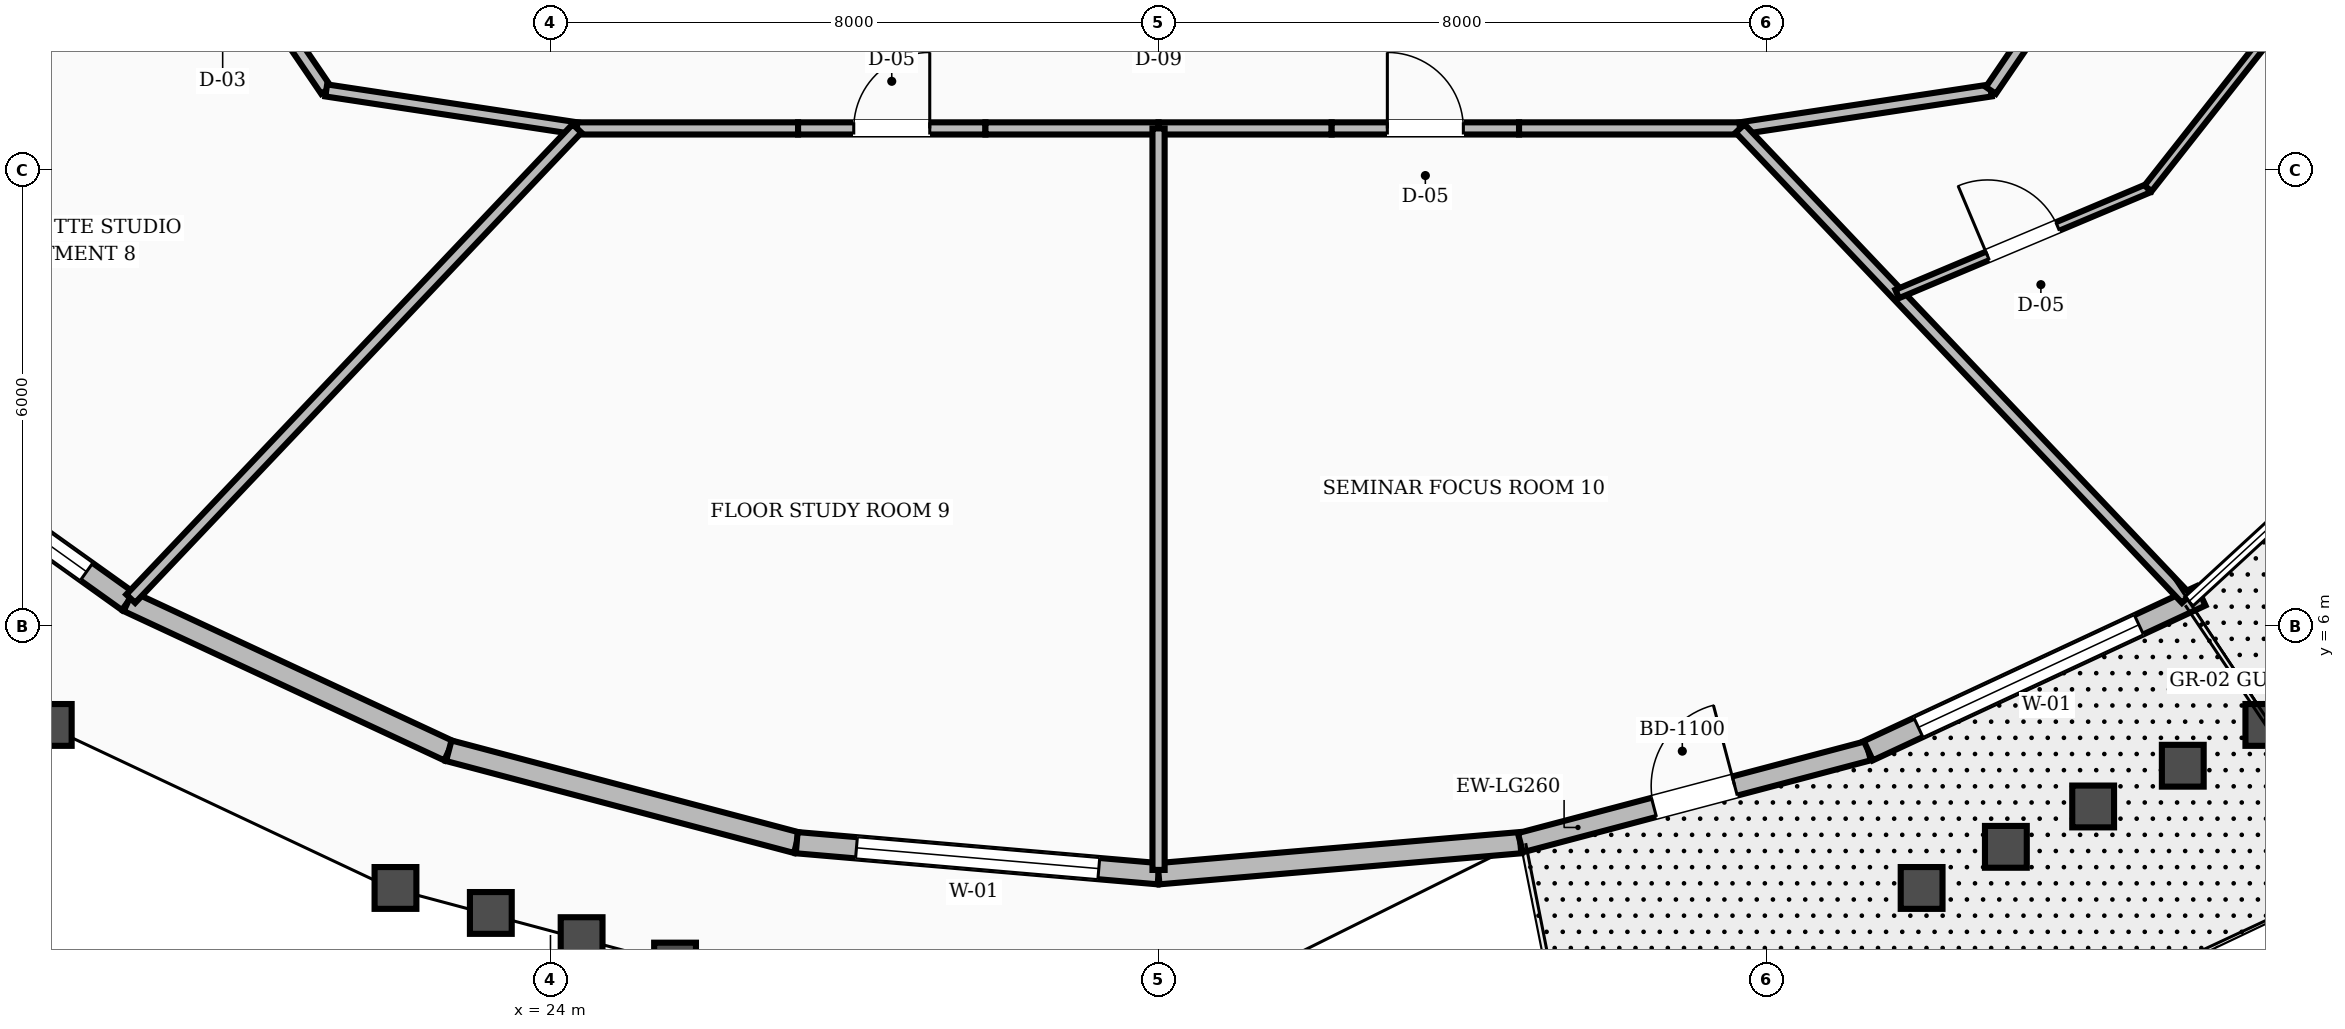
"""IFC4 building model, lengths in metres.
Left out: names, types, materials, properties, quantities, classifications, styles, units other than length and angle.
Written with IfcOpenShell. Run it as: python <this file> out.ifc"""

import sys

from ifc_helpers import new_model, si_unit, direction, frame, frame_2d, origin, place, context, subcontext, project, spatial, rectangle, extrude, element, fill, save


model = new_model("IFC4")
c1 = context("Model", 3, precision=1e-05, world=origin(), true_north=direction((0.0, 1.0)))
c2 = subcontext(c1, "Body", "Model", "MODEL_VIEW")
j1 = project(units=[si_unit("LENGTHUNIT", "METRE"), si_unit("PLANEANGLEUNIT", "RADIAN")], contexts=[c1])
p1 = place(None, origin())
s1 = spatial("IfcSite", under=j1, at=p1, CompositionType="ELEMENT")
p2 = place(p1, origin())
s2 = spatial("IfcBuilding", under=s1, at=p2, CompositionType="ELEMENT")
p3 = place(p2, frame((0.0, 0.0, 200.0)))
s3 = spatial("IfcBuildingStorey", under=s2, at=p3, CompositionType="ELEMENT", Elevation=200.0)
p4 = place(p3, frame((14.746, 8.97, 0.0), z_axis=(0.0, 0.0, 1.0), x_axis=(0.813519294528, -0.581537924327, 0.0)))
e1 = element("IfcWall", 1, at=p4, inside=s3, PredefinedType="STANDARD", context=c2, shape_type="SweptSolid", body=[
    extrude(rectangle(XDim=4.545, YDim=0.28, at=frame_2d((2.273, 0.0))), origin(), (0.0, 0.0, 1.0), 2.77),
])
p5 = place(p4, frame((0.673, 0.0, 0.8)))
e2 = element("IfcOpeningElement", 2, at=p5, cuts=e1, PredefinedType="OPENING", context=c2, shape_type="SweptSolid", body=[
    extrude(rectangle(XDim=3.2, YDim=1.65, at=frame_2d((1.6, 0.825))), frame((0.0, 0.15, 0.0), z_axis=(0.0, -1.0, 0.0), x_axis=(1.0, 0.0, 0.0)), (0.0, 0.0, 1.0), 0.3),
])
p6 = place(p3, frame((18.444, 6.327, 0.0), z_axis=(0.0, 0.0, 1.0), x_axis=(0.906555409807, -0.422086826315, 0.0)))
e3 = element("IfcWall", 3, at=p6, inside=s3, PredefinedType="STANDARD", context=c2, shape_type="SweptSolid", body=[
    extrude(rectangle(XDim=4.653, YDim=0.28, at=frame_2d((2.327, 0.0))), origin(), (0.0, 0.0, 1.0), 2.77),
])
p7 = place(p3, frame((22.662, 4.363, 0.0), z_axis=(0.0, 0.0, 1.0), x_axis=(0.966819561224, -0.255460243549, 0.0)))
e4 = element("IfcWall", 4, at=p7, inside=s3, PredefinedType="STANDARD", context=c2, shape_type="SweptSolid", body=[
    extrude(rectangle(XDim=4.734, YDim=0.28, at=frame_2d((2.367, 0.0))), origin(), (0.0, 0.0, 1.0), 2.77),
])
p8 = place(p3, frame((27.24, 3.153, 0.0), z_axis=(0.0, 0.0, 1.0), x_axis=(0.996339067147, -0.085489550689, 0.0)))
e5 = element("IfcWall", 5, at=p8, inside=s3, PredefinedType="STANDARD", context=c2, shape_type="SweptSolid", body=[
    extrude(rectangle(XDim=4.778, YDim=0.28, at=frame_2d((2.389, 0.0))), origin(), (0.0, 0.0, 1.0), 2.77),
])
p9 = place(p8, frame((0.789, 0.0, 0.8)))
e6 = element("IfcOpeningElement", 6, at=p9, cuts=e5, PredefinedType="OPENING", context=c2, shape_type="SweptSolid", body=[
    extrude(rectangle(XDim=3.2, YDim=1.65, at=frame_2d((1.6, 0.825))), frame((0.0, 0.15, 0.0), z_axis=(0.0, -1.0, 0.0), x_axis=(1.0, 0.0, 0.0)), (0.0, 0.0, 1.0), 0.3),
])
p10 = place(p3, frame((32.0, 2.745, 0.0), z_axis=(0.0, 0.0, 1.0), x_axis=(0.996339067147, 0.085489550689, 0.0)))
e7 = element("IfcWall", 7, at=p10, inside=s3, PredefinedType="STANDARD", context=c2, shape_type="SweptSolid", body=[
    extrude(rectangle(XDim=4.778, YDim=0.28, at=frame_2d((2.389, 0.0))), origin(), (0.0, 0.0, 1.0), 2.77),
])
p11 = place(p3, frame((36.76, 3.153, 0.0), z_axis=(0.0, 0.0, 1.0), x_axis=(0.966819561224, 0.255460243549, 0.0)))
e8 = element("IfcWall", 8, at=p11, inside=s3, PredefinedType="STANDARD", context=c2, shape_type="SweptSolid", body=[
    extrude(rectangle(XDim=4.734, YDim=0.26, at=frame_2d((2.367, 0.0))), origin(), (0.0, 0.0, 1.0), 2.77),
])
p12 = place(p11, frame((1.817, 0.0, 0.0)))
e9 = element("IfcOpeningElement", 9, at=p12, cuts=e8, PredefinedType="OPENING", context=c2, shape_type="SweptSolid", body=[
    extrude(rectangle(XDim=1.1, YDim=2.15, at=frame_2d((0.55, 1.075))), frame((0.0, 0.14, 0.0), z_axis=(0.0, -1.0, 0.0), x_axis=(1.0, 0.0, 0.0)), (0.0, 0.0, 1.0), 0.28),
])
p13 = place(p3, frame((41.338, 4.363, 0.0), z_axis=(0.0, 0.0, 1.0), x_axis=(0.906549700707, 0.422099088068, 0.0)))
e10 = element("IfcWall", 10, at=p13, inside=s3, PredefinedType="STANDARD", context=c2, shape_type="SweptSolid", body=[
    extrude(rectangle(XDim=4.828, YDim=0.28, at=frame_2d((2.414, 0.0))), origin(), (0.0, 0.0, 1.0), 2.77),
])
p14 = place(p13, frame((0.727, 0.0, 0.8)))
e11 = element("IfcOpeningElement", 11, at=p14, cuts=e10, PredefinedType="OPENING", context=c2, shape_type="SweptSolid", body=[
    extrude(rectangle(XDim=3.2, YDim=1.65, at=frame_2d((1.6, 0.825))), frame((0.0, 0.15, 0.0), z_axis=(0.0, -1.0, 0.0), x_axis=(1.0, 0.0, 0.0)), (0.0, 0.0, 1.0), 0.3),
])
p15 = place(p3, frame((19.35, 15.548, 0.0), z_axis=(0.0, 0.0, 1.0), x_axis=(0.562674669208, -0.826678423955, 0.0)))
e12 = element("IfcWall", 12, at=p15, inside=s3, PredefinedType="SOLIDWALL", context=c2, shape_type="SweptSolid", body=[
    extrude(rectangle(XDim=3.021, YDim=0.16, at=frame_2d((1.511, 0.0))), origin(), (0.0, 0.0, 1.0), 2.75),
])
p16 = place(p15, frame((1.036, 0.0, 0.0)))
e13 = element("IfcOpeningElement", 13, at=p16, cuts=e12, PredefinedType="OPENING", context=c2, shape_type="SweptSolid", body=[
    extrude(rectangle(XDim=0.95, YDim=2.1, at=frame_2d((0.475, 1.05))), frame((0.0, 0.09, 0.0), z_axis=(0.0, -1.0, 0.0), x_axis=(1.0, 0.0, 0.0)), (0.0, 0.0, 1.0), 0.18),
])
p17 = place(p3, frame((21.05, 13.05, 0.0), z_axis=(0.0, 0.0, 1.0), x_axis=(0.988710906508, -0.149835721217, 0.0)))
e14 = element("IfcWall", 14, at=p17, inside=s3, PredefinedType="SOLIDWALL", context=c2, shape_type="SweptSolid", body=[
    extrude(rectangle(XDim=3.337, YDim=0.16, at=frame_2d((1.668, 0.0))), origin(), (0.0, 0.0, 1.0), 2.75),
])
p18 = place(p3, frame((24.349, 12.55, 0.0), z_axis=(0.0, 0.0, 1.0), x_axis=(1.0, 0.0, 0.0)))
e15 = element("IfcWall", 15, at=p18, inside=s3, PredefinedType="SOLIDWALL", context=c2, shape_type="SweptSolid", body=[
    extrude(rectangle(XDim=2.908, YDim=0.16, at=frame_2d((1.454, 0.0))), origin(), (0.0, 0.0, 1.0), 2.75),
])
p19 = place(p3, frame((27.257, 12.55, 0.0), z_axis=(0.0, 0.0, 1.0), x_axis=(1.0, 0.0, 0.0)))
e16 = element("IfcWall", 16, at=p19, inside=s3, PredefinedType="SOLIDWALL", context=c2, shape_type="SweptSolid", body=[
    extrude(rectangle(XDim=2.465, YDim=0.16, at=frame_2d((1.232, 0.0))), origin(), (0.0, 0.0, 1.0), 2.75),
])
p20 = place(p19, frame((0.733, 0.0, 0.0)))
e17 = element("IfcOpeningElement", 17, at=p20, cuts=e16, PredefinedType="OPENING", context=c2, shape_type="SweptSolid", body=[
    extrude(rectangle(XDim=1.0, YDim=2.1, at=frame_2d((0.5, 1.05))), frame((0.0, 0.09, 0.0), z_axis=(0.0, -1.0, 0.0), x_axis=(1.0, 0.0, 0.0)), (0.0, 0.0, 1.0), 0.18),
])
for number, where, z_axis, x_axis in (
    (18, (29.722, 12.55, 0.0), (0.0, 0.0, 1.0), (1.0, 0.0, 0.0)),
    (19, (32.0, 12.55, 0.0), (0.0, 0.0, 1.0), (1.0, 0.0, 0.0)),
):
    element("IfcWall", number, at=place(p3, frame(where, z_axis=z_axis, x_axis=x_axis)), inside=s3, PredefinedType="SOLIDWALL", context=c2, shape_type="SweptSolid", body=[
        extrude(rectangle(XDim=2.278, YDim=0.16, at=frame_2d((1.139, 0.0))), origin(), (0.0, 0.0, 1.0), 2.75),
    ])
p21 = place(p3, frame((34.278, 12.55, 0.0), z_axis=(0.0, 0.0, 1.0), x_axis=(1.0, 0.0, 0.0)))
e20 = element("IfcWall", 20, at=p21, inside=s3, PredefinedType="SOLIDWALL", context=c2, shape_type="SweptSolid", body=[
    extrude(rectangle(XDim=2.465, YDim=0.16, at=frame_2d((1.232, 0.0))), origin(), (0.0, 0.0, 1.0), 2.75),
])
p22 = place(p21, frame((0.733, 0.0, 0.0)))
e21 = element("IfcOpeningElement", 21, at=p22, cuts=e20, PredefinedType="OPENING", context=c2, shape_type="SweptSolid", body=[
    extrude(rectangle(XDim=1.0, YDim=2.1, at=frame_2d((0.5, 1.05))), frame((0.0, 0.09, 0.0), z_axis=(0.0, -1.0, 0.0), x_axis=(1.0, 0.0, 0.0)), (0.0, 0.0, 1.0), 0.18),
])
p23 = place(p3, frame((36.743, 12.55, 0.0), z_axis=(0.0, 0.0, 1.0), x_axis=(1.0, 0.0, 0.0)))
e22 = element("IfcWall", 22, at=p23, inside=s3, PredefinedType="SOLIDWALL", context=c2, shape_type="SweptSolid", body=[
    extrude(rectangle(XDim=2.908, YDim=0.16, at=frame_2d((1.454, 0.0))), origin(), (0.0, 0.0, 1.0), 2.75),
])
p24 = place(p3, frame((39.651, 12.55, 0.0), z_axis=(0.0, 0.0, 1.0), x_axis=(0.988710906508, 0.149835721217, 0.0)))
e23 = element("IfcWall", 23, at=p24, inside=s3, PredefinedType="SOLIDWALL", context=c2, shape_type="SweptSolid", body=[
    extrude(rectangle(XDim=3.337, YDim=0.16, at=frame_2d((1.668, 0.0))), origin(), (0.0, 0.0, 1.0), 2.75),
])
p25 = place(p3, frame((42.95, 13.05, 0.0), z_axis=(0.0, 0.0, 1.0), x_axis=(0.562674669208, 0.826678423955, 0.0)))
e24 = element("IfcWall", 24, at=p25, inside=s3, PredefinedType="SOLIDWALL", context=c2, shape_type="SweptSolid", body=[
    extrude(rectangle(XDim=3.021, YDim=0.16, at=frame_2d((1.511, 0.0))), origin(), (0.0, 0.0, 1.0), 2.75),
])
p26 = place(p3, frame((39.651, 12.55, 0.0), z_axis=(0.0, 0.0, 1.0), x_axis=(0.688358927094, -0.725370241662, 0.0)))
e25 = element("IfcWall", 25, at=p26, inside=s3, PredefinedType="SOLIDWALL", context=c2, shape_type="SweptSolid", body=[
    extrude(rectangle(XDim=8.529, YDim=0.16, at=frame_2d((4.265, 0.0))), origin(), (0.0, 0.0, 1.0), 2.75),
])
p27 = place(p3, frame((41.718, 10.372, 0.0), z_axis=(0.0, 0.0, 1.0), x_axis=(0.921693123921, 0.387919818154, 0.0)))
e26 = element("IfcWall", 26, at=p27, inside=s3, PredefinedType="PARTITIONING", context=c2, shape_type="SweptSolid", body=[
    extrude(rectangle(XDim=3.58, YDim=0.12, at=frame_2d((1.79, 0.0))), origin(), (0.0, 0.0, 1.0), 2.75),
])
p28 = place(p27, frame((1.29, 0.0, 0.0)))
e27 = element("IfcOpeningElement", 27, at=p28, cuts=e26, PredefinedType="OPENING", context=c2, shape_type="SweptSolid", body=[
    extrude(rectangle(XDim=1.0, YDim=2.1, at=frame_2d((0.5, 1.05))), frame((0.0, 0.07, 0.0), z_axis=(0.0, -1.0, 0.0), x_axis=(1.0, 0.0, 0.0)), (0.0, 0.0, 1.0), 0.14),
])
p29 = place(p3, frame((45.018, 11.761, 0.0), z_axis=(0.0, 0.0, 1.0), x_axis=(0.618702194265, 0.785625607278, 0.0)))
e28 = element("IfcWall", 28, at=p29, inside=s3, PredefinedType="PARTITIONING", context=c2, shape_type="SweptSolid", body=[
    extrude(rectangle(XDim=3.463, YDim=0.12, at=frame_2d((1.732, 0.0))), origin(), (0.0, 0.0, 1.0), 2.75),
])
p30 = place(p3, frame((24.349, 12.55, 0.0), z_axis=(0.0, 0.0, 1.0), x_axis=(-0.688358927094, -0.725370241662, 0.0)))
e29 = element("IfcWall", 29, at=p30, inside=s3, PredefinedType="SOLIDWALL", context=c2, shape_type="SweptSolid", body=[
    extrude(rectangle(XDim=8.529, YDim=0.16, at=frame_2d((4.265, 0.0))), origin(), (0.0, 0.0, 1.0), 2.75),
])
p31 = place(p3, frame((32.0, 12.55, 0.0), z_axis=(0.0, 0.0, 1.0), x_axis=(0.0, -1.0, 0.0)))
e30 = element("IfcWall", 30, at=p31, inside=s3, PredefinedType="SOLIDWALL", context=c2, shape_type="SweptSolid", body=[
    extrude(rectangle(XDim=9.755, YDim=0.16, at=frame_2d((4.877, 0.0))), origin(), (0.0, 0.0, 1.0), 2.75),
])
p32 = place(p5, origin())
e31 = element("IfcWindow", 31, at=p32, inside=s3, PartitioningType="SINGLE_PANEL", PredefinedType="WINDOW", context=c2, shape_type="SweptSolid", body=[
    extrude(rectangle(XDim=3.2, YDim=1.65, at=frame_2d((1.6, 0.825))), frame((0.0, 0.03, 0.0), z_axis=(0.0, -1.0, 0.0), x_axis=(1.0, 0.0, 0.0)), (0.0, 0.0, 1.0), 0.06),
])
fill(e2, e31)
p33 = place(p9, origin())
e32 = element("IfcWindow", 32, at=p33, inside=s3, PartitioningType="SINGLE_PANEL", PredefinedType="WINDOW", context=c2, shape_type="SweptSolid", body=[
    extrude(rectangle(XDim=3.2, YDim=1.65, at=frame_2d((1.6, 0.825))), frame((0.0, 0.03, 0.0), z_axis=(0.0, -1.0, 0.0), x_axis=(1.0, 0.0, 0.0)), (0.0, 0.0, 1.0), 0.06),
])
fill(e6, e32)
p34 = place(p12, origin())
e33 = element("IfcDoor", 33, at=p34, inside=s3, OperationType="SINGLE_SWING_RIGHT", PredefinedType="DOOR", context=c2, shape_type="SweptSolid", body=[
    extrude(rectangle(XDim=1.1, YDim=2.15, at=frame_2d((0.55, 1.075))), frame((0.0, 0.025, 0.0), z_axis=(0.0, -1.0, 0.0), x_axis=(1.0, 0.0, 0.0)), (0.0, 0.0, 1.0), 0.05),
])
fill(e9, e33)
p35 = place(p14, origin())
e34 = element("IfcWindow", 34, at=p35, inside=s3, PartitioningType="SINGLE_PANEL", PredefinedType="WINDOW", context=c2, shape_type="SweptSolid", body=[
    extrude(rectangle(XDim=3.2, YDim=1.65, at=frame_2d((1.6, 0.825))), frame((0.0, 0.03, 0.0), z_axis=(0.0, -1.0, 0.0), x_axis=(1.0, 0.0, 0.0)), (0.0, 0.0, 1.0), 0.06),
])
fill(e11, e34)
p36 = place(p28, origin())
e35 = element("IfcDoor", 35, at=p36, inside=s3, OperationType="SINGLE_SWING_LEFT", PredefinedType="DOOR", context=c2, shape_type="SweptSolid", body=[
    extrude(rectangle(XDim=1.0, YDim=2.1, at=frame_2d((0.5, 1.05))), frame((0.0, 0.025, 0.0), z_axis=(0.0, -1.0, 0.0), x_axis=(1.0, 0.0, 0.0)), (0.0, 0.0, 1.0), 0.05),
])
fill(e27, e35)
p37 = place(p20, origin())
e36 = element("IfcDoor", 36, at=p37, inside=s3, OperationType="SINGLE_SWING_RIGHT", PredefinedType="DOOR", context=c2, shape_type="SweptSolid", body=[
    extrude(rectangle(XDim=1.0, YDim=2.1, at=frame_2d((0.5, 1.05))), frame((0.0, 0.025, 0.0), z_axis=(0.0, -1.0, 0.0), x_axis=(1.0, 0.0, 0.0)), (0.0, 0.0, 1.0), 0.05),
])
fill(e17, e36)
p38 = place(p22, origin())
e37 = element("IfcDoor", 37, at=p38, inside=s3, OperationType="SINGLE_SWING_LEFT", PredefinedType="DOOR", context=c2, shape_type="SweptSolid", body=[
    extrude(rectangle(XDim=1.0, YDim=2.1, at=frame_2d((0.5, 1.05))), frame((0.0, 0.025, 0.0), z_axis=(0.0, -1.0, 0.0), x_axis=(1.0, 0.0, 0.0)), (0.0, 0.0, 1.0), 0.05),
])
fill(e21, e37)
save(model, sys.argv[1])
